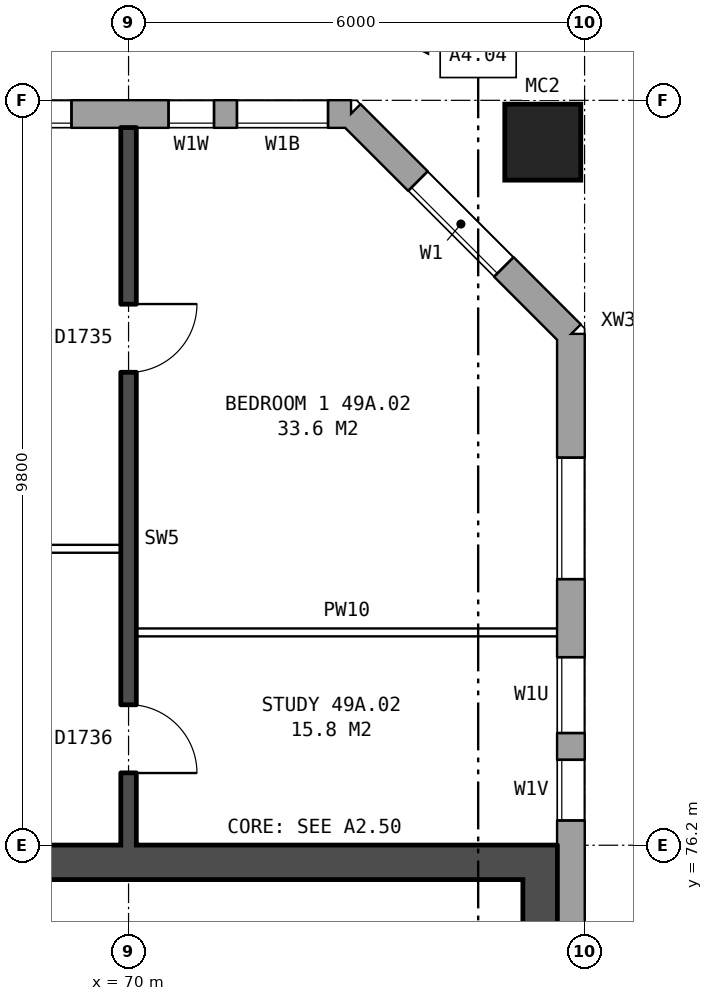
"""IFC4 building model, lengths in metres.
Left out: names, types, materials, properties, quantities, classifications, styles, units other than length and angle.
Written with IfcOpenShell. Run it as: python <this file> out.ifc"""

import sys

from ifc_helpers import new_model, si_unit, direction, frame, frame_2d, origin, origin_2d, place, context, subcontext, project, spatial, rectangle, hollow_rectangle, extrude, element, fill, save


model = new_model("IFC4")
c1 = context("Model", 3, precision=1e-05, world=origin(), true_north=direction((0.0, 1.0)))
c2 = subcontext(c1, "Body", "Model", "MODEL_VIEW")
j1 = project(units=[si_unit("LENGTHUNIT", "METRE"), si_unit("PLANEANGLEUNIT", "RADIAN")], contexts=[c1])
p1 = place(None, origin())
s1 = spatial("IfcSite", under=j1, at=p1, CompositionType="ELEMENT")
p2 = place(p1, origin())
s2 = spatial("IfcBuilding", under=s1, at=p2, CompositionType="ELEMENT")
p3 = place(p2, frame((0.0, 0.0, 175.8)))
s3 = spatial("IfcBuildingStorey", under=s2, at=p3, CompositionType="ELEMENT", Elevation=175.8)
p4 = place(p3, frame((75.45, 85.45, 0.0), z_axis=(0.0, 0.0, 1.0), x_axis=(1.0, 0.0, 0.0)))
e1 = element("IfcColumn", 1, at=p4, inside=s3, PredefinedType="COLUMN", context=c2, shape_type="SweptSolid", body=[
    extrude(hollow_rectangle(XDim=1.0, YDim=1.0, WallThickness=0.055, at=origin_2d()), origin(), (0.0, 0.0, 1.0), 3.1),
])
p5 = place(p3, frame((75.82, 57.075, 0.0), z_axis=(0.0, 0.0, 1.0), x_axis=(0.0, 1.0, 0.0)))
e2 = element("IfcWall", 2, at=p5, inside=s3, PredefinedType="STANDARD", context=c2, shape_type="SweptSolid", body=[
    extrude(rectangle(XDim=25.851, YDim=0.36, at=frame_2d((12.925, 0.0))), origin(), (0.0, 0.0, 1.0), 2.85),
])
p6 = place(p5, frame((1.625, 0.0, 0.8)))
e3 = element("IfcOpeningElement", 3, at=p6, cuts=e2, PredefinedType="OPENING", context=c2, shape_type="SweptSolid", body=[
    extrude(rectangle(XDim=1.6, YDim=1.8, at=frame_2d((0.8, 0.9))), frame((0.0, 0.19, 0.0), z_axis=(0.0, -1.0, 0.0), x_axis=(1.0, 0.0, 0.0)), (0.0, 0.0, 1.0), 0.38),
])
p7 = place(p5, frame((4.075, 0.0, 1.65)))
e4 = element("IfcOpeningElement", 4, at=p7, cuts=e2, PredefinedType="OPENING", context=c2, shape_type="SweptSolid", body=[
    extrude(rectangle(XDim=1.2, YDim=0.9, at=frame_2d((0.6, 0.45))), frame((0.0, 0.19, 0.0), z_axis=(0.0, -1.0, 0.0), x_axis=(1.0, 0.0, 0.0)), (0.0, 0.0, 1.0), 0.38),
])
p8 = place(p5, frame((19.45, 0.0, 0.35)))
e5 = element("IfcOpeningElement", 5, at=p8, cuts=e2, PredefinedType="OPENING", context=c2, shape_type="SweptSolid", body=[
    extrude(rectangle(XDim=0.8, YDim=0.9, at=frame_2d((0.4, 0.45))), frame((0.0, 0.19, 0.0), z_axis=(0.0, -1.0, 0.0), x_axis=(1.0, 0.0, 0.0)), (0.0, 0.0, 1.0), 0.38),
])
p9 = place(p5, frame((22.625, 0.0, 0.8)))
e6 = element("IfcOpeningElement", 6, at=p9, cuts=e2, PredefinedType="OPENING", context=c2, shape_type="SweptSolid", body=[
    extrude(rectangle(XDim=1.6, YDim=1.8, at=frame_2d((0.8, 0.9))), frame((0.0, 0.19, 0.0), z_axis=(0.0, -1.0, 0.0), x_axis=(1.0, 0.0, 0.0)), (0.0, 0.0, 1.0), 0.38),
])
p10 = place(p5, frame((5.775, 0.0, 0.45)))
e7 = element("IfcOpeningElement", 7, at=p10, cuts=e2, PredefinedType="OPENING", context=c2, shape_type="SweptSolid", body=[
    extrude(rectangle(XDim=0.6, YDim=0.9, at=frame_2d((0.3, 0.45))), frame((0.0, 0.19, 0.0), z_axis=(0.0, -1.0, 0.0), x_axis=(1.0, 0.0, 0.0)), (0.0, 0.0, 1.0), 0.38),
])
p11 = place(p5, frame((20.6, 0.0, 1.65)))
e8 = element("IfcOpeningElement", 8, at=p11, cuts=e2, PredefinedType="OPENING", context=c2, shape_type="SweptSolid", body=[
    extrude(rectangle(XDim=1.0, YDim=0.9, at=frame_2d((0.5, 0.45))), frame((0.0, 0.19, 0.0), z_axis=(0.0, -1.0, 0.0), x_axis=(1.0, 0.0, 0.0)), (0.0, 0.0, 1.0), 0.38),
])
p12 = place(p3, frame((75.82, 82.925, 0.0), z_axis=(0.0, 0.0, 1.0), x_axis=(-0.707106781187, 0.707106781187, 0.0)))
e9 = element("IfcWall", 9, at=p12, inside=s3, PredefinedType="STANDARD", context=c2, shape_type="SweptSolid", body=[
    extrude(rectangle(XDim=4.094, YDim=0.36, at=frame_2d((2.047, 0.0))), origin(), (0.0, 0.0, 1.0), 2.85),
])
p13 = place(p12, frame((1.247, 0.0, 0.8)))
e10 = element("IfcOpeningElement", 10, at=p13, cuts=e9, PredefinedType="OPENING", context=c2, shape_type="SweptSolid", body=[
    extrude(rectangle(XDim=1.6, YDim=1.8, at=frame_2d((0.8, 0.9))), frame((0.0, 0.19, 0.0), z_axis=(0.0, -1.0, 0.0), x_axis=(1.0, 0.0, 0.0)), (0.0, 0.0, 1.0), 0.38),
])
p14 = place(p3, frame((72.925, 85.82, 0.0), z_axis=(0.0, 0.0, 1.0), x_axis=(-1.0, 0.0, 0.0)))
e11 = element("IfcWall", 11, at=p14, inside=s3, PredefinedType="STANDARD", context=c2, shape_type="SweptSolid", body=[
    extrude(rectangle(XDim=39.601, YDim=0.36, at=frame_2d((19.8, 0.0))), origin(), (0.0, 0.0, 1.0), 2.85),
])
p15 = place(p14, frame((0.3, 0.0, 0.8)))
e12 = element("IfcOpeningElement", 12, at=p15, cuts=e11, PredefinedType="OPENING", context=c2, shape_type="SweptSolid", body=[
    extrude(rectangle(XDim=1.2, YDim=1.8, at=frame_2d((0.6, 0.9))), frame((0.0, 0.19, 0.0), z_axis=(0.0, -1.0, 0.0), x_axis=(1.0, 0.0, 0.0)), (0.0, 0.0, 1.0), 0.38),
])
p16 = place(p14, frame((3.675, 0.0, 0.8)))
e13 = element("IfcOpeningElement", 13, at=p16, cuts=e11, PredefinedType="OPENING", context=c2, shape_type="SweptSolid", body=[
    extrude(rectangle(XDim=0.6, YDim=0.9, at=frame_2d((0.3, 0.45))), frame((0.0, 0.19, 0.0), z_axis=(0.0, -1.0, 0.0), x_axis=(1.0, 0.0, 0.0)), (0.0, 0.0, 1.0), 0.38),
])
p17 = place(p14, frame((6.625, 0.0, 0.8)))
e14 = element("IfcOpeningElement", 14, at=p17, cuts=e11, PredefinedType="OPENING", context=c2, shape_type="SweptSolid", body=[
    extrude(rectangle(XDim=1.6, YDim=1.8, at=frame_2d((0.8, 0.9))), frame((0.0, 0.19, 0.0), z_axis=(0.0, -1.0, 0.0), x_axis=(1.0, 0.0, 0.0)), (0.0, 0.0, 1.0), 0.38),
])
p18 = place(p14, frame((9.625, 0.0, 0.8)))
e15 = element("IfcOpeningElement", 15, at=p18, cuts=e11, PredefinedType="OPENING", context=c2, shape_type="SweptSolid", body=[
    extrude(rectangle(XDim=1.6, YDim=1.8, at=frame_2d((0.8, 0.9))), frame((0.0, 0.19, 0.0), z_axis=(0.0, -1.0, 0.0), x_axis=(1.0, 0.0, 0.0)), (0.0, 0.0, 1.0), 0.38),
])
p19 = place(p14, frame((12.625, 0.0, 0.8)))
e16 = element("IfcOpeningElement", 16, at=p19, cuts=e11, PredefinedType="OPENING", context=c2, shape_type="SweptSolid", body=[
    extrude(rectangle(XDim=1.6, YDim=1.8, at=frame_2d((0.8, 0.9))), frame((0.0, 0.19, 0.0), z_axis=(0.0, -1.0, 0.0), x_axis=(1.0, 0.0, 0.0)), (0.0, 0.0, 1.0), 0.38),
])
p20 = place(p14, frame((15.625, 0.0, 0.8)))
e17 = element("IfcOpeningElement", 17, at=p20, cuts=e11, PredefinedType="OPENING", context=c2, shape_type="SweptSolid", body=[
    extrude(rectangle(XDim=1.6, YDim=1.8, at=frame_2d((0.8, 0.9))), frame((0.0, 0.19, 0.0), z_axis=(0.0, -1.0, 0.0), x_axis=(1.0, 0.0, 0.0)), (0.0, 0.0, 1.0), 0.38),
])
p21 = place(p14, frame((18.625, 0.0, 0.8)))
e18 = element("IfcOpeningElement", 18, at=p21, cuts=e11, PredefinedType="OPENING", context=c2, shape_type="SweptSolid", body=[
    extrude(rectangle(XDim=1.6, YDim=1.8, at=frame_2d((0.8, 0.9))), frame((0.0, 0.19, 0.0), z_axis=(0.0, -1.0, 0.0), x_axis=(1.0, 0.0, 0.0)), (0.0, 0.0, 1.0), 0.38),
])
p22 = place(p14, frame((21.625, 0.0, 0.8)))
e19 = element("IfcOpeningElement", 19, at=p22, cuts=e11, PredefinedType="OPENING", context=c2, shape_type="SweptSolid", body=[
    extrude(rectangle(XDim=1.6, YDim=1.8, at=frame_2d((0.8, 0.9))), frame((0.0, 0.19, 0.0), z_axis=(0.0, -1.0, 0.0), x_axis=(1.0, 0.0, 0.0)), (0.0, 0.0, 1.0), 0.38),
])
p23 = place(p14, frame((24.625, 0.0, 0.8)))
e20 = element("IfcOpeningElement", 20, at=p23, cuts=e11, PredefinedType="OPENING", context=c2, shape_type="SweptSolid", body=[
    extrude(rectangle(XDim=1.6, YDim=1.8, at=frame_2d((0.8, 0.9))), frame((0.0, 0.19, 0.0), z_axis=(0.0, -1.0, 0.0), x_axis=(1.0, 0.0, 0.0)), (0.0, 0.0, 1.0), 0.38),
])
p24 = place(p14, frame((27.625, 0.0, 0.8)))
e21 = element("IfcOpeningElement", 21, at=p24, cuts=e11, PredefinedType="OPENING", context=c2, shape_type="SweptSolid", body=[
    extrude(rectangle(XDim=1.6, YDim=1.8, at=frame_2d((0.8, 0.9))), frame((0.0, 0.19, 0.0), z_axis=(0.0, -1.0, 0.0), x_axis=(1.0, 0.0, 0.0)), (0.0, 0.0, 1.0), 0.38),
])
p25 = place(p14, frame((30.625, 0.0, 0.8)))
e22 = element("IfcOpeningElement", 22, at=p25, cuts=e11, PredefinedType="OPENING", context=c2, shape_type="SweptSolid", body=[
    extrude(rectangle(XDim=1.6, YDim=1.8, at=frame_2d((0.8, 0.9))), frame((0.0, 0.19, 0.0), z_axis=(0.0, -1.0, 0.0), x_axis=(1.0, 0.0, 0.0)), (0.0, 0.0, 1.0), 0.38),
])
p26 = place(p14, frame((33.625, 0.0, 0.8)))
e23 = element("IfcOpeningElement", 23, at=p26, cuts=e11, PredefinedType="OPENING", context=c2, shape_type="SweptSolid", body=[
    extrude(rectangle(XDim=1.6, YDim=1.8, at=frame_2d((0.8, 0.9))), frame((0.0, 0.19, 0.0), z_axis=(0.0, -1.0, 0.0), x_axis=(1.0, 0.0, 0.0)), (0.0, 0.0, 1.0), 0.38),
])
p27 = place(p14, frame((37.025, 0.0, 1.7)))
e24 = element("IfcOpeningElement", 24, at=p27, cuts=e11, PredefinedType="OPENING", context=c2, shape_type="SweptSolid", body=[
    extrude(rectangle(XDim=0.8, YDim=0.9, at=frame_2d((0.4, 0.45))), frame((0.0, 0.19, 0.0), z_axis=(0.0, -1.0, 0.0), x_axis=(1.0, 0.0, 0.0)), (0.0, 0.0, 1.0), 0.38),
])
p28 = place(p14, frame((1.8, 0.0, 1.6)))
e25 = element("IfcOpeningElement", 25, at=p28, cuts=e11, PredefinedType="OPENING", context=c2, shape_type="SweptSolid", body=[
    extrude(rectangle(XDim=0.6, YDim=0.9, at=frame_2d((0.3, 0.45))), frame((0.0, 0.19, 0.0), z_axis=(0.0, -1.0, 0.0), x_axis=(1.0, 0.0, 0.0)), (0.0, 0.0, 1.0), 0.38),
])
p29 = place(p14, frame((4.575, 0.0, 0.8)))
e26 = element("IfcOpeningElement", 26, at=p29, cuts=e11, PredefinedType="OPENING", context=c2, shape_type="SweptSolid", body=[
    extrude(rectangle(XDim=1.6, YDim=1.8, at=frame_2d((0.8, 0.9))), frame((0.0, 0.19, 0.0), z_axis=(0.0, -1.0, 0.0), x_axis=(1.0, 0.0, 0.0)), (0.0, 0.0, 1.0), 0.38),
])
p30 = place(p14, frame((38.125, 0.0, 0.8)))
e27 = element("IfcOpeningElement", 27, at=p30, cuts=e11, PredefinedType="OPENING", context=c2, shape_type="SweptSolid", body=[
    extrude(rectangle(XDim=0.6, YDim=1.8, at=frame_2d((0.3, 0.9))), frame((0.0, 0.19, 0.0), z_axis=(0.0, -1.0, 0.0), x_axis=(1.0, 0.0, 0.0)), (0.0, 0.0, 1.0), 0.38),
])
p31 = place(p3, frame((75.415, 63.8, 0.0), z_axis=(0.0, 0.0, 1.0), x_axis=(0.0, 1.0, 0.0)))
e28 = element("IfcWall", 28, at=p31, inside=s3, PredefinedType="SHEAR", context=c2, shape_type="SweptSolid", body=[
    extrude(rectangle(XDim=12.4, YDim=0.45, at=frame_2d((6.2, 0.0))), origin(), (0.0, 0.0, 1.0), 2.85),
])
p32 = place(p3, frame((67.09, 75.975, 0.0), z_axis=(0.0, 0.0, 1.0), x_axis=(1.0, 0.0, 0.0)))
e29 = element("IfcWall", 29, at=p32, inside=s3, PredefinedType="SHEAR", context=c2, shape_type="SweptSolid", body=[
    extrude(rectangle(XDim=8.1, YDim=0.45, at=frame_2d((4.05, 0.0))), origin(), (0.0, 0.0, 1.0), 2.85),
])
p33 = place(p3, frame((70.1, 79.0, 0.0), z_axis=(0.0, 0.0, 1.0), x_axis=(1.0, 0.0, 0.0)))
e30 = element("IfcWall", 30, at=p33, inside=s3, PredefinedType="PARTITIONING", context=c2, shape_type="SweptSolid", body=[
    extrude(rectangle(XDim=5.54, YDim=0.1, at=frame_2d((2.77, 0.0))), origin(), (0.0, 0.0, 1.0), 2.85),
])
p34 = place(p3, frame((64.1, 80.1, 0.0), z_axis=(0.0, 0.0, 1.0), x_axis=(1.0, 0.0, 0.0)))
e31 = element("IfcWall", 31, at=p34, inside=s3, PredefinedType="PARTITIONING", context=c2, shape_type="SweptSolid", body=[
    extrude(rectangle(XDim=5.8, YDim=0.1, at=frame_2d((2.9, 0.0))), origin(), (0.0, 0.0, 1.0), 2.85),
])
p35 = place(p34, frame((3.6, 0.0, 0.0)))
e32 = element("IfcOpeningElement", 32, at=p35, cuts=e31, PredefinedType="OPENING", context=c2, shape_type="SweptSolid", body=[
    extrude(rectangle(XDim=0.9, YDim=2.1, at=frame_2d((0.45, 1.05))), frame((0.0, 0.06, 0.0), z_axis=(0.0, -1.0, 0.0), x_axis=(1.0, 0.0, 0.0)), (0.0, 0.0, 1.0), 0.12),
])
p36 = place(p34, frame((0.7, 0.0, 0.0)))
e33 = element("IfcOpeningElement", 33, at=p36, cuts=e31, PredefinedType="OPENING", context=c2, shape_type="SweptSolid", body=[
    extrude(rectangle(XDim=0.9, YDim=2.1, at=frame_2d((0.45, 1.05))), frame((0.0, 0.06, 0.0), z_axis=(0.0, -1.0, 0.0), x_axis=(1.0, 0.0, 0.0)), (0.0, 0.0, 1.0), 0.12),
])
p37 = place(p3, frame((70.0, 76.2, 0.0), z_axis=(0.0, 0.0, 1.0), x_axis=(0.0, 1.0, 0.0)))
e34 = element("IfcWall", 34, at=p37, inside=s3, PredefinedType="SOLIDWALL", context=c2, shape_type="SweptSolid", body=[
    extrude(rectangle(XDim=9.44, YDim=0.2, at=frame_2d((4.72, 0.0))), origin(), (0.0, 0.0, 1.0), 2.85),
])
p38 = place(p37, frame((6.22, 0.0, 0.0)))
e35 = element("IfcOpeningElement", 35, at=p38, cuts=e34, PredefinedType="OPENING", context=c2, shape_type="SweptSolid", body=[
    extrude(rectangle(XDim=0.9, YDim=2.1, at=frame_2d((0.45, 1.05))), frame((0.0, 0.11, 0.0), z_axis=(0.0, -1.0, 0.0), x_axis=(1.0, 0.0, 0.0)), (0.0, 0.0, 1.0), 0.22),
])
p39 = place(p37, frame((0.95, 0.0, 0.0)))
e36 = element("IfcOpeningElement", 36, at=p39, cuts=e34, PredefinedType="OPENING", context=c2, shape_type="SweptSolid", body=[
    extrude(rectangle(XDim=0.9, YDim=2.1, at=frame_2d((0.45, 1.05))), frame((0.0, 0.11, 0.0), z_axis=(0.0, -1.0, 0.0), x_axis=(1.0, 0.0, 0.0)), (0.0, 0.0, 1.0), 0.22),
])
p40 = place(p8, origin())
e37 = element("IfcWindow", 37, at=p40, inside=s3, PartitioningType="SINGLE_PANEL", PredefinedType="WINDOW", context=c2, shape_type="SweptSolid", body=[
    extrude(rectangle(XDim=0.8, YDim=0.9, at=frame_2d((0.4, 0.45))), frame((0.0, 0.15, 0.0), z_axis=(0.0, -1.0, 0.0), x_axis=(1.0, 0.0, 0.0)), (0.0, 0.0, 1.0), 0.06),
])
fill(e5, e37)
p41 = place(p9, origin())
e38 = element("IfcWindow", 38, at=p41, inside=s3, PartitioningType="SINGLE_PANEL", PredefinedType="WINDOW", context=c2, shape_type="SweptSolid", body=[
    extrude(rectangle(XDim=1.6, YDim=1.8, at=frame_2d((0.8, 0.9))), frame((0.0, 0.15, 0.0), z_axis=(0.0, -1.0, 0.0), x_axis=(1.0, 0.0, 0.0)), (0.0, 0.0, 1.0), 0.06),
])
fill(e6, e38)
p42 = place(p13, origin())
e39 = element("IfcWindow", 39, at=p42, inside=s3, PartitioningType="SINGLE_PANEL", PredefinedType="WINDOW", context=c2, shape_type="SweptSolid", body=[
    extrude(rectangle(XDim=1.6, YDim=1.8, at=frame_2d((0.8, 0.9))), frame((0.0, 0.15, 0.0), z_axis=(0.0, -1.0, 0.0), x_axis=(1.0, 0.0, 0.0)), (0.0, 0.0, 1.0), 0.06),
])
fill(e10, e39)
p43 = place(p15, origin())
e40 = element("IfcWindow", 40, at=p43, inside=s3, PartitioningType="SINGLE_PANEL", PredefinedType="WINDOW", context=c2, shape_type="SweptSolid", body=[
    extrude(rectangle(XDim=1.2, YDim=1.8, at=frame_2d((0.6, 0.9))), frame((0.0, 0.15, 0.0), z_axis=(0.0, -1.0, 0.0), x_axis=(1.0, 0.0, 0.0)), (0.0, 0.0, 1.0), 0.06),
])
fill(e12, e40)
p44 = place(p16, origin())
e41 = element("IfcWindow", 41, at=p44, inside=s3, PartitioningType="SINGLE_PANEL", PredefinedType="WINDOW", context=c2, shape_type="SweptSolid", body=[
    extrude(rectangle(XDim=0.6, YDim=0.9, at=frame_2d((0.3, 0.45))), frame((0.0, 0.15, 0.0), z_axis=(0.0, -1.0, 0.0), x_axis=(1.0, 0.0, 0.0)), (0.0, 0.0, 1.0), 0.06),
])
fill(e13, e41)
p45 = place(p38, frame((0.9, 0.0, 0.0), z_axis=(0.0, 0.0, 1.0), x_axis=(-1.0, 0.0, 0.0)))
e42 = element("IfcDoor", 42, at=p45, inside=s3, OperationType="SINGLE_SWING_LEFT", PredefinedType="DOOR", context=c2, shape_type="SweptSolid", body=[
    extrude(rectangle(XDim=0.9, YDim=2.1, at=frame_2d((0.45, 1.05))), frame((0.0, 0.025, 0.0), z_axis=(0.0, -1.0, 0.0), x_axis=(1.0, 0.0, 0.0)), (0.0, 0.0, 1.0), 0.05),
])
fill(e35, e42)
p46 = place(p39, frame((0.9, 0.0, 0.0), z_axis=(0.0, 0.0, 1.0), x_axis=(-1.0, 0.0, 0.0)))
e43 = element("IfcDoor", 43, at=p46, inside=s3, OperationType="SINGLE_SWING_RIGHT", PredefinedType="DOOR", context=c2, shape_type="SweptSolid", body=[
    extrude(rectangle(XDim=0.9, YDim=2.1, at=frame_2d((0.45, 1.05))), frame((0.0, 0.025, 0.0), z_axis=(0.0, -1.0, 0.0), x_axis=(1.0, 0.0, 0.0)), (0.0, 0.0, 1.0), 0.05),
])
fill(e36, e43)
p47 = place(p11, origin())
e44 = element("IfcWindow", 44, at=p47, inside=s3, PartitioningType="SINGLE_PANEL", PredefinedType="WINDOW", context=c2, shape_type="SweptSolid", body=[
    extrude(rectangle(XDim=1.0, YDim=0.9, at=frame_2d((0.5, 0.45))), frame((0.0, 0.15, 0.0), z_axis=(0.0, -1.0, 0.0), x_axis=(1.0, 0.0, 0.0)), (0.0, 0.0, 1.0), 0.06),
])
fill(e8, e44)
p48 = place(p28, origin())
e45 = element("IfcWindow", 45, at=p48, inside=s3, PartitioningType="SINGLE_PANEL", PredefinedType="WINDOW", context=c2, shape_type="SweptSolid", body=[
    extrude(rectangle(XDim=0.6, YDim=0.9, at=frame_2d((0.3, 0.45))), frame((0.0, 0.15, 0.0), z_axis=(0.0, -1.0, 0.0), x_axis=(1.0, 0.0, 0.0)), (0.0, 0.0, 1.0), 0.06),
])
fill(e25, e45)
save(model, sys.argv[1])
